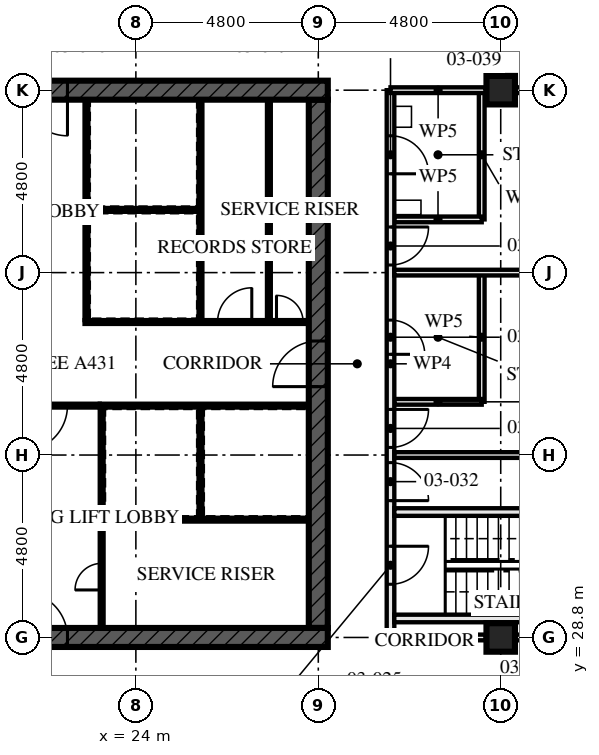
"""IFC4 building model, lengths in metres.
Left out: names, types, materials, properties, quantities, classifications, styles, units other than length and angle.
Written with IfcOpenShell. Run it as: python <this file> out.ifc"""

import sys

from ifc_helpers import new_model, si_unit, direction, frame, frame_2d, origin, origin_2d, place, context, subcontext, project, spatial, rectangle, hollow_rectangle, extrude, element, fill, save


model = new_model("IFC4")
c1 = context("Model", 3, precision=1e-05, world=origin(), true_north=direction((0.0, 1.0)))
c2 = subcontext(c1, "Body", "Model", "MODEL_VIEW")
j1 = project(units=[si_unit("LENGTHUNIT", "METRE"), si_unit("PLANEANGLEUNIT", "RADIAN")], contexts=[c1])
p1 = place(None, origin())
s1 = spatial("IfcSite", under=j1, at=p1, CompositionType="ELEMENT")
p2 = place(p1, origin())
s2 = spatial("IfcBuilding", under=s1, at=p2, CompositionType="ELEMENT")
p3 = place(p2, frame((0.0, 0.0, 13.5)))
s3 = spatial("IfcBuildingStorey", under=s2, at=p3, CompositionType="ELEMENT", Elevation=13.5)
for number, where, z_axis, x_axis in (
    (1, (33.6, 28.8, 0.0), (0.0, 0.0, 1.0), (0.0, 1.0, 0.0)),
    (2, (33.6, 43.2, 0.0), (0.0, 0.0, 1.0), (0.0, 1.0, 0.0)),
):
    element("IfcColumn", number, at=place(p3, frame(where, z_axis=z_axis, x_axis=x_axis)), inside=s3, PredefinedType="COLUMN", context=c2, shape_type="SweptSolid", body=[
        extrude(hollow_rectangle(XDim=0.75, YDim=0.75, WallThickness=0.08, at=origin_2d()), origin(), (0.0, 0.0, 1.0), 4.5),
    ])
p4 = place(p3, frame((14.15, 28.8, -0.17), z_axis=(0.0, 0.0, 1.0), x_axis=(1.0, 0.0, 0.0)))
e3 = element("IfcWall", 3, at=p4, inside=s3, PredefinedType="SHEAR", context=c2, shape_type="SweptSolid", body=[
    extrude(rectangle(XDim=14.9, YDim=0.5, at=frame_2d((7.45, 0.0))), origin(), (0.0, 0.0, 1.0), 4.5),
])
p5 = place(p4, frame((6.85, 0.0, 0.17)))
e4 = element("IfcOpeningElement", 4, at=p5, cuts=e3, PredefinedType="OPENING", context=c2, shape_type="SweptSolid", body=[
    extrude(rectangle(XDim=1.2, YDim=2.1, at=frame_2d((0.6, 1.05))), frame((0.0, 0.26, 0.0), z_axis=(0.0, -1.0, 0.0), x_axis=(1.0, 0.0, 0.0)), (0.0, 0.0, 1.0), 0.521),
])
p6 = place(p3, frame((29.05, 43.2, -0.17), z_axis=(0.0, 0.0, 1.0), x_axis=(-1.0, 0.0, 0.0)))
e5 = element("IfcWall", 5, at=p6, inside=s3, PredefinedType="SHEAR", context=c2, shape_type="SweptSolid", body=[
    extrude(rectangle(XDim=14.9, YDim=0.5, at=frame_2d((7.45, 0.0))), origin(), (0.0, 0.0, 1.0), 4.5),
])
p7 = place(p6, frame((6.85, 0.0, 0.17)))
e6 = element("IfcOpeningElement", 6, at=p7, cuts=e5, PredefinedType="OPENING", context=c2, shape_type="SweptSolid", body=[
    extrude(rectangle(XDim=1.2, YDim=2.1, at=frame_2d((0.6, 1.05))), frame((0.0, 0.26, 0.0), z_axis=(0.0, -1.0, 0.0), x_axis=(1.0, 0.0, 0.0)), (0.0, 0.0, 1.0), 0.521),
])
p8 = place(p3, frame((28.8, 29.05, -0.17), z_axis=(0.0, 0.0, 1.0), x_axis=(0.0, 1.0, 0.0)))
e7 = element("IfcWall", 7, at=p8, inside=s3, PredefinedType="SHEAR", context=c2, shape_type="SweptSolid", body=[
    extrude(rectangle(XDim=13.9, YDim=0.5, at=frame_2d((6.95, 0.0))), origin(), (0.0, 0.0, 1.0), 4.5),
])
p9 = place(p8, frame((6.35, 0.0, 0.17)))
e8 = element("IfcOpeningElement", 8, at=p9, cuts=e7, PredefinedType="OPENING", context=c2, shape_type="SweptSolid", body=[
    extrude(rectangle(XDim=1.2, YDim=2.1, at=frame_2d((0.6, 1.05))), frame((0.0, 0.26, 0.0), z_axis=(0.0, -1.0, 0.0), x_axis=(1.0, 0.0, 0.0)), (0.0, 0.0, 1.0), 0.521),
])
for number, where, z_axis, x_axis in (
    (9, (35.5, 29.3, 0.0), (0.0, 0.0, 1.0), (-1.0, 0.0, 0.0)),
    (10, (35.5, 32.1, 0.0), (0.0, 0.0, 1.0), (-1.0, 0.0, 0.0)),
):
    element("IfcWall", number, at=place(p3, frame(where, z_axis=z_axis, x_axis=x_axis)), inside=s3, PredefinedType="SOLIDWALL", context=c2, shape_type="SweptSolid", body=[
        extrude(rectangle(XDim=4.7, YDim=0.2, at=frame_2d((2.35, 0.0))), origin(), (0.0, 0.0, 1.0), 3.99),
    ])
p10 = place(p3, frame((33.1, 35.0, 0.0), z_axis=(0.0, 0.0, 1.0), x_axis=(-1.0, 0.0, 0.0)))
e11 = element("IfcWall", 11, at=p10, inside=s3, PredefinedType="PARTITIONING", context=c2, shape_type="SweptSolid", body=[
    extrude(rectangle(XDim=2.3, YDim=0.15, at=frame_2d((1.15, 0.0))), origin(), (0.0, 0.0, 1.0), 4.33),
])
p11 = place(p3, frame((33.1, 35.0, 0.0), z_axis=(0.0, 0.0, 1.0), x_axis=(0.0, 1.0, 0.0)))
e12 = element("IfcWall", 12, at=p11, inside=s3, PredefinedType="PARTITIONING", context=c2, shape_type="SweptSolid", body=[
    extrude(rectangle(XDim=3.4, YDim=0.15, at=frame_2d((1.7, 0.0))), origin(), (0.0, 0.0, 1.0), 4.33),
])
p12 = place(p3, frame((33.1, 39.8, 0.0), z_axis=(0.0, 0.0, 1.0), x_axis=(-1.0, 0.0, 0.0)))
e13 = element("IfcWall", 13, at=p12, inside=s3, PredefinedType="PARTITIONING", context=c2, shape_type="SweptSolid", body=[
    extrude(rectangle(XDim=2.3, YDim=0.15, at=frame_2d((1.15, 0.0))), origin(), (0.0, 0.0, 1.0), 4.33),
])
p13 = place(p3, frame((33.1, 39.8, 0.0), z_axis=(0.0, 0.0, 1.0), x_axis=(0.0, 1.0, 0.0)))
e14 = element("IfcWall", 14, at=p13, inside=s3, PredefinedType="PARTITIONING", context=c2, shape_type="SweptSolid", body=[
    extrude(rectangle(XDim=3.4, YDim=0.15, at=frame_2d((1.7, 0.0))), origin(), (0.0, 0.0, 1.0), 4.33),
])
for number, where, z_axis, x_axis in (
    (15, (42.805, 33.6, 0.0), (0.0, 0.0, 1.0), (-1.0, 0.0, 0.0)),
    (16, (42.805, 38.4, 0.0), (0.0, 0.0, 1.0), (-1.0, 0.0, 0.0)),
):
    element("IfcWall", number, at=place(p3, frame(where, z_axis=z_axis, x_axis=x_axis)), inside=s3, PredefinedType="PARTITIONING", context=c2, shape_type="SweptSolid", body=[
        extrude(rectangle(XDim=12.005, YDim=0.15, at=frame_2d((6.002, 0.0))), origin(), (0.0, 0.0, 1.0), 3.55),
    ])
p14 = place(p3, frame((30.7, 28.8, 0.0), z_axis=(0.0, 0.0, 1.0), x_axis=(0.0, 1.0, 0.0)))
e17 = element("IfcWall", 17, at=p14, inside=s3, PredefinedType="PARTITIONING", context=c2, shape_type="SweptSolid", body=[
    extrude(rectangle(XDim=14.4, YDim=0.2, at=frame_2d((7.2, 0.0))), origin(), (0.0, 0.0, 1.0), 3.55),
])
p15 = place(p14, frame((1.4, 0.0, 0.0)))
e18 = element("IfcOpeningElement", 18, at=p15, cuts=e17, PredefinedType="OPENING", context=c2, shape_type="SweptSolid", body=[
    extrude(rectangle(XDim=1.0, YDim=2.1, at=frame_2d((0.5, 1.05))), frame((0.0, 0.111, 0.0), z_axis=(0.0, -1.0, 0.0), x_axis=(1.0, 0.0, 0.0)), (0.0, 0.0, 1.0), 0.221),
])
p16 = place(p14, frame((3.6, 0.0, 0.0)))
e19 = element("IfcOpeningElement", 19, at=p16, cuts=e17, PredefinedType="OPENING", context=c2, shape_type="SweptSolid", body=[
    extrude(rectangle(XDim=1.0, YDim=2.4, at=frame_2d((0.5, 1.2))), frame((0.0, 0.111, 0.0), z_axis=(0.0, -1.0, 0.0), x_axis=(1.0, 0.0, 0.0)), (0.0, 0.0, 1.0), 0.221),
])
p17 = place(p14, frame((5.0, 0.0, 0.0)))
e20 = element("IfcOpeningElement", 20, at=p17, cuts=e17, PredefinedType="OPENING", context=c2, shape_type="SweptSolid", body=[
    extrude(rectangle(XDim=1.0, YDim=2.4, at=frame_2d((0.5, 1.2))), frame((0.0, 0.111, 0.0), z_axis=(0.0, -1.0, 0.0), x_axis=(1.0, 0.0, 0.0)), (0.0, 0.0, 1.0), 0.221),
])
p18 = place(p14, frame((9.8, 0.0, 0.0)))
e21 = element("IfcOpeningElement", 21, at=p18, cuts=e17, PredefinedType="OPENING", context=c2, shape_type="SweptSolid", body=[
    extrude(rectangle(XDim=1.0, YDim=2.4, at=frame_2d((0.5, 1.2))), frame((0.0, 0.111, 0.0), z_axis=(0.0, -1.0, 0.0), x_axis=(1.0, 0.0, 0.0)), (0.0, 0.0, 1.0), 0.221),
])
p19 = place(p14, frame((7.45, 0.0, 0.0)))
e22 = element("IfcOpeningElement", 22, at=p19, cuts=e17, PredefinedType="OPENING", context=c2, shape_type="SweptSolid", body=[
    extrude(rectangle(XDim=0.9, YDim=2.1, at=frame_2d((0.45, 1.05))), frame((0.0, 0.111, 0.0), z_axis=(0.0, -1.0, 0.0), x_axis=(1.0, 0.0, 0.0)), (0.0, 0.0, 1.0), 0.221),
])
p20 = place(p14, frame((12.2, 0.0, 0.0)))
e23 = element("IfcOpeningElement", 23, at=p20, cuts=e17, PredefinedType="OPENING", context=c2, shape_type="SweptSolid", body=[
    extrude(rectangle(XDim=1.0, YDim=2.1, at=frame_2d((0.5, 1.05))), frame((0.0, 0.111, 0.0), z_axis=(0.0, -1.0, 0.0), x_axis=(1.0, 0.0, 0.0)), (0.0, 0.0, 1.0), 0.221),
])
for number, where, z_axis, x_axis in (
    (24, (27.5, 37.15, 0.0), (0.0, 0.0, 1.0), (0.0, 1.0, 0.0)),
    (25, (22.7, 37.15, 0.0), (0.0, 0.0, 1.0), (0.0, 1.0, 0.0)),
):
    element("IfcWall", number, at=place(p3, frame(where, z_axis=z_axis, x_axis=x_axis)), inside=s3, PredefinedType="SOLIDWALL", context=c2, shape_type="SweptSolid", body=[
        extrude(rectangle(XDim=5.8, YDim=0.1, at=frame_2d((2.9, 0.0))), origin(), (0.0, 0.0, 1.0), 4.33),
    ])
p21 = place(p3, frame((23.1, 29.05, 0.0), z_axis=(0.0, 0.0, 1.0), x_axis=(0.0, 1.0, 0.0)))
e26 = element("IfcWall", 26, at=p21, inside=s3, PredefinedType="SOLIDWALL", context=c2, shape_type="SweptSolid", body=[
    extrude(rectangle(XDim=5.8, YDim=0.1, at=frame_2d((2.9, 0.0))), origin(), (0.0, 0.0, 1.0), 4.33),
])
p22 = place(p21, frame((1.0, 0.0, 0.0)))
e27 = element("IfcOpeningElement", 27, at=p22, cuts=e26, PredefinedType="OPENING", context=c2, shape_type="SweptSolid", body=[
    extrude(rectangle(XDim=0.7, YDim=2.1, at=frame_2d((0.35, 1.05))), frame((0.0, 0.061, 0.0), z_axis=(0.0, -1.0, 0.0), x_axis=(1.0, 0.0, 0.0)), (0.0, 0.0, 1.0), 0.121),
])
p23 = place(p3, frame((23.05, 34.9, 0.0), z_axis=(0.0, 0.0, 1.0), x_axis=(1.0, 0.0, 0.0)))
e28 = element("IfcWall", 28, at=p23, inside=s3, PredefinedType="SOLIDWALL", context=c2, shape_type="SweptSolid", body=[
    extrude(rectangle(XDim=5.5, YDim=0.1, at=frame_2d((2.75, 0.0))), origin(), (0.0, 0.0, 1.0), 4.33),
])
p24 = place(p3, frame((22.65, 37.1, 0.0), z_axis=(0.0, 0.0, 1.0), x_axis=(1.0, 0.0, 0.0)))
e29 = element("IfcWall", 29, at=p24, inside=s3, PredefinedType="SOLIDWALL", context=c2, shape_type="SweptSolid", body=[
    extrude(rectangle(XDim=5.9, YDim=0.1, at=frame_2d((2.95, 0.0))), origin(), (0.0, 0.0, 1.0), 4.33),
])
p25 = place(p24, frame((3.5, 0.0, 0.0)))
e30 = element("IfcOpeningElement", 30, at=p25, cuts=e29, PredefinedType="OPENING", context=c2, shape_type="SweptSolid", body=[
    extrude(rectangle(XDim=0.9, YDim=2.1, at=frame_2d((0.45, 1.05))), frame((0.0, 0.061, 0.0), z_axis=(0.0, -1.0, 0.0), x_axis=(1.0, 0.0, 0.0)), (0.0, 0.0, 1.0), 0.121),
])
p26 = place(p24, frame((5.05, 0.0, 0.0)))
e31 = element("IfcOpeningElement", 31, at=p26, cuts=e29, PredefinedType="OPENING", context=c2, shape_type="SweptSolid", body=[
    extrude(rectangle(XDim=0.7, YDim=2.1, at=frame_2d((0.35, 1.05))), frame((0.0, 0.061, 0.0), z_axis=(0.0, -1.0, 0.0), x_axis=(1.0, 0.0, 0.0)), (0.0, 0.0, 1.0), 0.121),
])
p27 = place(p3, frame((20.55, 34.9, 0.0), z_axis=(0.0, 0.0, 1.0), x_axis=(1.0, 0.0, 0.0)))
e32 = element("IfcWall", 32, at=p27, inside=s3, PredefinedType="SOLIDWALL", context=c2, shape_type="SweptSolid", body=[
    extrude(rectangle(XDim=2.5, YDim=0.1, at=frame_2d((1.25, 0.0))), origin(), (0.0, 0.0, 1.0), 4.33),
])
p28 = place(p27, frame((0.45, 0.0, 0.0)))
e33 = element("IfcOpeningElement", 33, at=p28, cuts=e32, PredefinedType="OPENING", context=c2, shape_type="SweptSolid", body=[
    extrude(rectangle(XDim=1.2, YDim=2.1, at=frame_2d((0.6, 1.05))), frame((0.0, 0.061, 0.0), z_axis=(0.0, -1.0, 0.0), x_axis=(1.0, 0.0, 0.0)), (0.0, 0.0, 1.0), 0.121),
])
p29 = place(p3, frame((22.75, 40.05, 0.0), z_axis=(0.0, 0.0, 1.0), x_axis=(1.0, 0.0, 0.0)))
e34 = element("IfcWall", 34, at=p29, inside=s3, PredefinedType="SOLIDWALL", context=c2, shape_type="SweptSolid", body=[
    extrude(rectangle(XDim=2.9, YDim=0.1, at=frame_2d((1.45, 0.0))), origin(), (0.0, 0.0, 1.0), 4.33),
])
p30 = place(p3, frame((25.7, 37.15, 0.0), z_axis=(0.0, 0.0, 1.0), x_axis=(0.0, 1.0, 0.0)))
e35 = element("IfcWall", 35, at=p30, inside=s3, PredefinedType="SOLIDWALL", context=c2, shape_type="SweptSolid", body=[
    extrude(rectangle(XDim=5.8, YDim=0.1, at=frame_2d((2.9, 0.0))), origin(), (0.0, 0.0, 1.0), 4.33),
])
p31 = place(p3, frame((25.7, 31.95, 0.0), z_axis=(0.0, 0.0, 1.0), x_axis=(0.0, 1.0, 0.0)))
e36 = element("IfcWall", 36, at=p31, inside=s3, PredefinedType="SOLIDWALL", context=c2, shape_type="SweptSolid", body=[
    extrude(rectangle(XDim=2.9, YDim=0.1, at=frame_2d((1.45, 0.0))), origin(), (0.0, 0.0, 1.0), 4.33),
])
p32 = place(p3, frame((23.15, 31.9, 0.0), z_axis=(0.0, 0.0, 1.0), x_axis=(1.0, 0.0, 0.0)))
e37 = element("IfcWall", 37, at=p32, inside=s3, PredefinedType="SOLIDWALL", context=c2, shape_type="SweptSolid", body=[
    extrude(rectangle(XDim=5.4, YDim=0.1, at=frame_2d((2.7, 0.0))), origin(), (0.0, 0.0, 1.0), 4.33),
])
p33 = place(p3, frame((38.005, 28.8, 0.0), z_axis=(0.0, 0.0, 1.0), x_axis=(-1.0, 0.0, 0.0)))
e38 = element("IfcWall", 38, at=p33, inside=s3, PredefinedType="PARTITIONING", context=c2, shape_type="SweptSolid", body=[
    extrude(rectangle(XDim=4.01, YDim=0.15, at=frame_2d((2.005, 0.0))), origin(), (0.0, 0.0, 1.0), 3.32),
])
p34 = place(p3, frame((33.205, 28.8, 0.0), z_axis=(0.0, 0.0, 1.0), x_axis=(-1.0, 0.0, 0.0)))
e39 = element("IfcWall", 39, at=p34, inside=s3, PredefinedType="PARTITIONING", context=c2, shape_type="SweptSolid", body=[
    extrude(rectangle(XDim=2.505, YDim=0.15, at=frame_2d((1.252, 0.0))), origin(), (0.0, 0.0, 1.0), 3.32),
])
p35 = place(p3, frame((38.005, 43.2, 0.0), z_axis=(0.0, 0.0, 1.0), x_axis=(-1.0, 0.0, 0.0)))
e40 = element("IfcWall", 40, at=p35, inside=s3, PredefinedType="PARTITIONING", context=c2, shape_type="SweptSolid", body=[
    extrude(rectangle(XDim=4.01, YDim=0.15, at=frame_2d((2.005, 0.0))), origin(), (0.0, 0.0, 1.0), 3.32),
])
p36 = place(p3, frame((33.205, 43.2, 0.0), z_axis=(0.0, 0.0, 1.0), x_axis=(-1.0, 0.0, 0.0)))
e41 = element("IfcWall", 41, at=p36, inside=s3, PredefinedType="PARTITIONING", context=c2, shape_type="SweptSolid", body=[
    extrude(rectangle(XDim=2.505, YDim=0.15, at=frame_2d((1.252, 0.0))), origin(), (0.0, 0.0, 1.0), 3.32),
])
p37 = place(p15, frame((1.0, 0.0, 0.0), z_axis=(0.0, 0.0, 1.0), x_axis=(-1.0, 0.0, 0.0)))
e42 = element("IfcDoor", 42, at=p37, inside=s3, OperationType="SINGLE_SWING_RIGHT", PredefinedType="DOOR", context=c2, shape_type="SweptSolid", body=[
    extrude(rectangle(XDim=1.0, YDim=2.1, at=frame_2d((0.5, 1.05))), frame((0.0, 0.032, 0.0), z_axis=(0.0, -1.0, 0.0), x_axis=(1.0, 0.0, 0.0)), (0.0, 0.0, 1.0), 0.064),
])
fill(e18, e42)
p38 = place(p16, frame((1.0, 0.0, 0.0), z_axis=(0.0, 0.0, 1.0), x_axis=(-1.0, 0.0, 0.0)))
e43 = element("IfcDoor", 43, at=p38, inside=s3, OperationType="SINGLE_SWING_LEFT", PredefinedType="DOOR", context=c2, shape_type="SweptSolid", body=[
    extrude(rectangle(XDim=1.0, YDim=2.4, at=frame_2d((0.5, 1.2))), frame((0.0, 0.027, 0.0), z_axis=(0.0, -1.0, 0.0), x_axis=(1.0, 0.0, 0.0)), (0.0, 0.0, 1.0), 0.054),
])
fill(e19, e43)
p39 = place(p17, frame((1.0, 0.0, 0.0), z_axis=(0.0, 0.0, 1.0), x_axis=(-1.0, 0.0, 0.0)))
e44 = element("IfcDoor", 44, at=p39, inside=s3, OperationType="SINGLE_SWING_RIGHT", PredefinedType="DOOR", context=c2, shape_type="SweptSolid", body=[
    extrude(rectangle(XDim=1.0, YDim=2.4, at=frame_2d((0.5, 1.2))), frame((0.0, 0.027, 0.0), z_axis=(0.0, -1.0, 0.0), x_axis=(1.0, 0.0, 0.0)), (0.0, 0.0, 1.0), 0.054),
])
fill(e20, e44)
p40 = place(p18, frame((1.0, 0.0, 0.0), z_axis=(0.0, 0.0, 1.0), x_axis=(-1.0, 0.0, 0.0)))
e45 = element("IfcDoor", 45, at=p40, inside=s3, OperationType="SINGLE_SWING_RIGHT", PredefinedType="DOOR", context=c2, shape_type="SweptSolid", body=[
    extrude(rectangle(XDim=1.0, YDim=2.4, at=frame_2d((0.5, 1.2))), frame((0.0, 0.027, 0.0), z_axis=(0.0, -1.0, 0.0), x_axis=(1.0, 0.0, 0.0)), (0.0, 0.0, 1.0), 0.054),
])
fill(e21, e45)
p41 = place(p19, frame((0.9, 0.0, 0.0), z_axis=(0.0, 0.0, 1.0), x_axis=(-1.0, 0.0, 0.0)))
e46 = element("IfcDoor", 46, at=p41, inside=s3, OperationType="SINGLE_SWING_LEFT", PredefinedType="DOOR", context=c2, shape_type="SweptSolid", body=[
    extrude(rectangle(XDim=0.9, YDim=2.1, at=frame_2d((0.45, 1.05))), frame((0.0, 0.027, 0.0), z_axis=(0.0, -1.0, 0.0), x_axis=(1.0, 0.0, 0.0)), (0.0, 0.0, 1.0), 0.054),
])
fill(e22, e46)
p42 = place(p20, frame((1.0, 0.0, 0.0), z_axis=(0.0, 0.0, 1.0), x_axis=(-1.0, 0.0, 0.0)))
e47 = element("IfcDoor", 47, at=p42, inside=s3, OperationType="SINGLE_SWING_LEFT", PredefinedType="DOOR", context=c2, shape_type="SweptSolid", body=[
    extrude(rectangle(XDim=1.0, YDim=2.1, at=frame_2d((0.5, 1.05))), frame((0.0, 0.027, 0.0), z_axis=(0.0, -1.0, 0.0), x_axis=(1.0, 0.0, 0.0)), (0.0, 0.0, 1.0), 0.054),
])
fill(e23, e47)
p43 = place(p22, origin())
e48 = element("IfcDoor", 48, at=p43, inside=s3, OperationType="SINGLE_SWING_RIGHT", PredefinedType="DOOR", context=c2, shape_type="SweptSolid", body=[
    extrude(rectangle(XDim=0.7, YDim=2.1, at=frame_2d((0.35, 1.05))), frame((0.0, 0.027, 0.0), z_axis=(0.0, -1.0, 0.0), x_axis=(1.0, 0.0, 0.0)), (0.0, 0.0, 1.0), 0.054),
])
fill(e27, e48)
p44 = place(p25, origin())
e49 = element("IfcDoor", 49, at=p44, inside=s3, OperationType="SINGLE_SWING_LEFT", PredefinedType="DOOR", context=c2, shape_type="SweptSolid", body=[
    extrude(rectangle(XDim=0.9, YDim=2.1, at=frame_2d((0.45, 1.05))), frame((0.0, 0.027, 0.0), z_axis=(0.0, -1.0, 0.0), x_axis=(1.0, 0.0, 0.0)), (0.0, 0.0, 1.0), 0.054),
])
fill(e30, e49)
p45 = place(p26, origin())
e50 = element("IfcDoor", 50, at=p45, inside=s3, OperationType="SINGLE_SWING_RIGHT", PredefinedType="DOOR", context=c2, shape_type="SweptSolid", body=[
    extrude(rectangle(XDim=0.7, YDim=2.1, at=frame_2d((0.35, 1.05))), frame((0.0, 0.027, 0.0), z_axis=(0.0, -1.0, 0.0), x_axis=(1.0, 0.0, 0.0)), (0.0, 0.0, 1.0), 0.054),
])
fill(e31, e50)
p46 = place(p28, frame((1.2, 0.0, 0.0), z_axis=(0.0, 0.0, 1.0), x_axis=(-1.0, 0.0, 0.0)))
e51 = element("IfcDoor", 51, at=p46, inside=s3, OperationType="SINGLE_SWING_LEFT", PredefinedType="DOOR", context=c2, shape_type="SweptSolid", body=[
    extrude(rectangle(XDim=1.2, YDim=2.1, at=frame_2d((0.6, 1.05))), frame((0.0, 0.027, 0.0), z_axis=(0.0, -1.0, 0.0), x_axis=(1.0, 0.0, 0.0)), (0.0, 0.0, 1.0), 0.054),
])
fill(e33, e51)
p47 = place(p5, origin())
e52 = element("IfcDoor", 52, at=p47, inside=s3, OperationType="SINGLE_SWING_LEFT", PredefinedType="DOOR", context=c2, shape_type="SweptSolid", body=[
    extrude(rectangle(XDim=1.2, YDim=2.1, at=frame_2d((0.6, 1.05))), frame((0.0, 0.027, 0.0), z_axis=(0.0, -1.0, 0.0), x_axis=(1.0, 0.0, 0.0)), (0.0, 0.0, 1.0), 0.054),
])
fill(e4, e52)
p48 = place(p9, origin())
e53 = element("IfcDoor", 53, at=p48, inside=s3, OperationType="SINGLE_SWING_LEFT", PredefinedType="DOOR", context=c2, shape_type="SweptSolid", body=[
    extrude(rectangle(XDim=1.2, YDim=2.1, at=frame_2d((0.6, 1.05))), frame((0.0, 0.027, 0.0), z_axis=(0.0, -1.0, 0.0), x_axis=(1.0, 0.0, 0.0)), (0.0, 0.0, 1.0), 0.054),
])
fill(e8, e53)
p49 = place(p7, origin())
e54 = element("IfcDoor", 54, at=p49, inside=s3, OperationType="SINGLE_SWING_LEFT", PredefinedType="DOOR", context=c2, shape_type="SweptSolid", body=[
    extrude(rectangle(XDim=1.2, YDim=2.1, at=frame_2d((0.6, 1.05))), frame((0.0, 0.027, 0.0), z_axis=(0.0, -1.0, 0.0), x_axis=(1.0, 0.0, 0.0)), (0.0, 0.0, 1.0), 0.054),
])
fill(e6, e54)
save(model, sys.argv[1])
